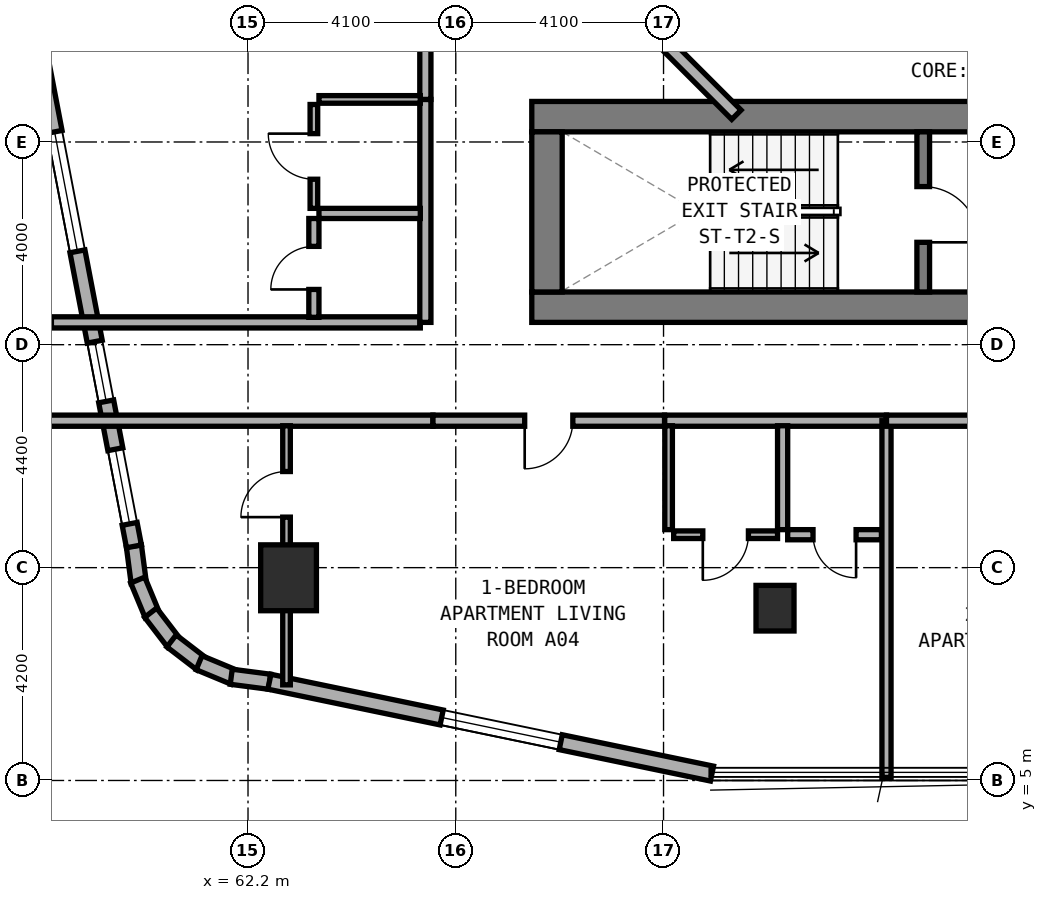
"""IFC4 building model, lengths in metres.
Left out: names, types, materials, properties, quantities, classifications, styles, units other than length and angle.
Written with IfcOpenShell. Run it as: python <this file> out.ifc"""

import sys

from ifc_helpers import new_model, si_unit, direction, frame, frame_2d, origin, origin_2d, place, context, subcontext, project, spatial, rectangle, extrude, element, fill, save


model = new_model("IFC4")
c1 = context("Model", 3, precision=1e-05, world=origin(), true_north=direction((0.0, 1.0)))
c2 = subcontext(c1, "Body", "Model", "MODEL_VIEW")
j1 = project(units=[si_unit("LENGTHUNIT", "METRE"), si_unit("PLANEANGLEUNIT", "RADIAN")], contexts=[c1])
p1 = place(None, origin())
s1 = spatial("IfcSite", under=j1, at=p1, CompositionType="ELEMENT")
p2 = place(p1, origin())
s2 = spatial("IfcBuilding", under=s1, at=p2, CompositionType="ELEMENT")
p3 = place(p2, frame((0.0, 0.0, 31.0)))
s3 = spatial("IfcBuildingStorey", under=s2, at=p3, CompositionType="ELEMENT", Elevation=31.0)
p4 = place(p3, frame((67.8, 14.34, 0.0), z_axis=(0.0, 0.0, 1.0), x_axis=(1.0, 0.0, 0.0)))
e1 = element("IfcWall", 1, at=p4, inside=s3, PredefinedType="SHEAR", context=c2, shape_type="SweptSolid", body=[
    extrude(rectangle(XDim=18.6, YDim=0.6, at=frame_2d((9.3, 0.0))), origin(), (0.0, 0.0, 1.0), 3.5),
])
p5 = place(p4, frame((9.35, 0.0, 0.0)))
e2 = element("IfcOpeningElement", 2, at=p5, cuts=e1, PredefinedType="OPENING", context=c2, shape_type="SweptSolid", body=[
    extrude(rectangle(XDim=1.2, YDim=2.15, at=frame_2d((0.6, 1.075))), frame((0.0, 0.31, 0.0), z_axis=(0.0, -1.0, 0.0), x_axis=(1.0, 0.0, 0.0)), (0.0, 0.0, 1.0), 0.62),
])
p6 = place(p4, frame((16.95, 0.0, 0.0)))
e3 = element("IfcOpeningElement", 3, at=p6, cuts=e1, PredefinedType="OPENING", context=c2, shape_type="SweptSolid", body=[
    extrude(rectangle(XDim=0.85, YDim=2.1, at=frame_2d((0.425, 1.05))), frame((0.0, 0.31, 0.0), z_axis=(0.0, -1.0, 0.0), x_axis=(1.0, 0.0, 0.0)), (0.0, 0.0, 1.0), 0.62),
])
p7 = place(p4, frame((12.55, 0.0, 0.0)))
e4 = element("IfcOpeningElement", 4, at=p7, cuts=e1, PredefinedType="OPENING", context=c2, shape_type="SweptSolid", body=[
    extrude(rectangle(XDim=1.1, YDim=2.15, at=frame_2d((0.55, 1.075))), frame((0.0, 0.31, 0.0), z_axis=(0.0, -1.0, 0.0), x_axis=(1.0, 0.0, 0.0)), (0.0, 0.0, 1.0), 0.62),
])
p8 = place(p4, frame((14.15, 0.0, 0.0)))
e5 = element("IfcOpeningElement", 5, at=p8, cuts=e1, PredefinedType="OPENING", context=c2, shape_type="SweptSolid", body=[
    extrude(rectangle(XDim=1.1, YDim=2.15, at=frame_2d((0.55, 1.075))), frame((0.0, 0.31, 0.0), z_axis=(0.0, -1.0, 0.0), x_axis=(1.0, 0.0, 0.0)), (0.0, 0.0, 1.0), 0.62),
])
p9 = place(p3, frame((67.8, 18.1, 0.0), z_axis=(0.0, 0.0, 1.0), x_axis=(1.0, 0.0, 0.0)))
e6 = element("IfcWall", 6, at=p9, inside=s3, PredefinedType="SHEAR", context=c2, shape_type="SweptSolid", body=[
    extrude(rectangle(XDim=18.6, YDim=0.6, at=frame_2d((9.3, 0.0))), origin(), (0.0, 0.0, 1.0), 3.5),
])
p10 = place(p3, frame((68.1, 14.64, 0.0), z_axis=(0.0, 0.0, 1.0), x_axis=(0.0, 1.0, 0.0)))
e7 = element("IfcWall", 7, at=p10, inside=s3, PredefinedType="SHEAR", context=c2, shape_type="SweptSolid", body=[
    extrude(rectangle(XDim=3.16, YDim=0.6, at=frame_2d((1.58, 0.0))), origin(), (0.0, 0.0, 1.0), 3.5),
])
p11 = place(p3, frame((75.525, 14.64, 0.0), z_axis=(0.0, 0.0, 1.0), x_axis=(0.0, 1.0, 0.0)))
e8 = element("IfcWall", 8, at=p11, inside=s3, PredefinedType="STANDARD", context=c2, shape_type="SweptSolid", body=[
    extrude(rectangle(XDim=3.16, YDim=0.25, at=frame_2d((1.58, 0.0))), origin(), (0.0, 0.0, 1.0), 3.25),
])
p12 = place(p11, frame((0.98, 0.0, 0.0)))
e9 = element("IfcOpeningElement", 9, at=p12, cuts=e8, PredefinedType="OPENING", context=c2, shape_type="SweptSolid", body=[
    extrude(rectangle(XDim=1.1, YDim=2.15, at=frame_2d((0.55, 1.075))), frame((0.0, 0.135, 0.0), z_axis=(0.0, -1.0, 0.0), x_axis=(1.0, 0.0, 0.0)), (0.0, 0.0, 1.0), 0.27),
])
p13 = place(p3, frame((72.6, 8.4, 0.0), z_axis=(0.0, 0.0, 1.0), x_axis=(1.0, 0.0, 0.0)))
e10 = element("IfcColumn", 10, at=p13, inside=s3, PredefinedType="COLUMN", context=c2, shape_type="SweptSolid", body=[
    extrude(rectangle(XDim=0.75, YDim=0.9, at=origin_2d()), origin(), (0.0, 0.0, 1.0), 3.5),
])
p14 = place(p3, frame((63.0, 9.0, 0.0), z_axis=(0.0, 0.0, 1.0), x_axis=(1.0, 0.0, 0.0)))
e11 = element("IfcColumn", 11, at=p14, inside=s3, PredefinedType="COLUMN", context=c2, shape_type="SweptSolid", body=[
    extrude(rectangle(XDim=1.1, YDim=1.3, at=origin_2d()), origin(), (0.0, 0.0, 1.0), 3.5),
])
p15 = place(p3, frame((59.948, 9.627, 0.0), z_axis=(0.0, 0.0, 1.0), x_axis=(0.130255288807, -0.991480488834, 0.0)))
e12 = element("IfcWall", 12, at=p15, inside=s3, PredefinedType="STANDARD", context=c2, shape_type="SweptSolid", body=[
    extrude(rectangle(XDim=0.729, YDim=0.3, at=frame_2d((0.365, 0.0))), origin(), (0.0, 0.0, 1.0), 3.25),
])
for number, where, z_axis, x_axis in (
    (13, (60.024, 8.955, 0.0), (0.0, 0.0, 1.0), (0.384, -0.924, 0.0)),
    (14, (60.279, 8.311, 0.0), (0.0, 0.0, 1.0), (0.608, -0.794, 0.0)),
    (15, (60.691, 7.754, 0.0), (0.0, 0.0, 1.0), (0.794, -0.608, 0.0)),
    (16, (61.234, 7.324, 0.0), (0.0, 0.0, 1.0), (0.924, -0.383, 0.0)),
):
    element("IfcWall", number, at=place(p3, frame(where, z_axis=z_axis, x_axis=x_axis)), inside=s3, PredefinedType="STANDARD", context=c2, shape_type="SweptSolid", body=[
        extrude(rectangle(XDim=0.746, YDim=0.3, at=frame_2d((0.373, 0.0))), origin(), (0.0, 0.0, 1.0), 3.25),
    ])
p16 = place(p3, frame((61.869, 7.047, 0.0), z_axis=(0.0, 0.0, 1.0), x_axis=(0.991559404866, -0.129653178221, 0.0)))
e17 = element("IfcWall", 17, at=p16, inside=s3, PredefinedType="STANDARD", context=c2, shape_type="SweptSolid", body=[
    extrude(rectangle(XDim=0.764, YDim=0.3, at=frame_2d((0.382, 0.0))), origin(), (0.0, 0.0, 1.0), 3.25),
])
p17 = place(p3, frame((62.622, 6.949, 0.0), z_axis=(0.0, 0.0, 1.0), x_axis=(0.979127260729, -0.203248142175, 0.0)))
e18 = element("IfcWall", 18, at=p17, inside=s3, PredefinedType="STANDARD", context=c2, shape_type="SweptSolid", body=[
    extrude(rectangle(XDim=8.92, YDim=0.3, at=frame_2d((4.46, 0.0))), origin(), (0.0, 0.0, 1.0), 3.25),
])
p18 = place(p17, frame((3.472, 0.0, 0.8)))
e19 = element("IfcOpeningElement", 19, at=p18, cuts=e18, PredefinedType="OPENING", context=c2, shape_type="SweptSolid", body=[
    extrude(rectangle(XDim=2.4, YDim=1.6, at=frame_2d((1.2, 0.8))), frame((0.0, 0.16, 0.0), z_axis=(0.0, -1.0, 0.0), x_axis=(1.0, 0.0, 0.0)), (0.0, 0.0, 1.0), 0.32),
])
p19 = place(p3, frame((58.137, 19.082, 0.0), z_axis=(0.0, 0.0, 1.0), x_axis=(0.188087874316, -0.982152203854, 0.0)))
e20 = element("IfcWall", 20, at=p19, inside=s3, PredefinedType="STANDARD", context=c2, shape_type="SweptSolid", body=[
    extrude(rectangle(XDim=9.634, YDim=0.3, at=frame_2d((4.817, 0.0))), origin(), (0.0, 0.0, 1.0), 3.25),
])
p20 = place(p19, frame((1.306, 0.0, 0.8)))
e21 = element("IfcOpeningElement", 21, at=p20, cuts=e20, PredefinedType="OPENING", context=c2, shape_type="SweptSolid", body=[
    extrude(rectangle(XDim=2.4, YDim=1.6, at=frame_2d((1.2, 0.8))), frame((0.0, 0.16, 0.0), z_axis=(0.0, -1.0, 0.0), x_axis=(1.0, 0.0, 0.0)), (0.0, 0.0, 1.0), 0.32),
])
p21 = place(p19, frame((5.521, 0.0, 0.85)))
e22 = element("IfcOpeningElement", 22, at=p21, cuts=e20, PredefinedType="OPENING", context=c2, shape_type="SweptSolid", body=[
    extrude(rectangle(XDim=1.2, YDim=1.5, at=frame_2d((0.6, 0.75))), frame((0.0, 0.16, 0.0), z_axis=(0.0, -1.0, 0.0), x_axis=(1.0, 0.0, 0.0)), (0.0, 0.0, 1.0), 0.32),
])
p22 = place(p19, frame((7.682, 0.0, 0.85)))
e23 = element("IfcOpeningElement", 23, at=p22, cuts=e20, PredefinedType="OPENING", context=c2, shape_type="SweptSolid", body=[
    extrude(rectangle(XDim=1.5, YDim=1.5, at=frame_2d((0.75, 0.75))), frame((0.0, 0.16, 0.0), z_axis=(0.0, -1.0, 0.0), x_axis=(1.0, 0.0, 0.0)), (0.0, 0.0, 1.0), 0.32),
])
p23 = place(p3, frame((70.204, 19.772, 0.0), z_axis=(0.0, 0.0, 1.0), x_axis=(0.707053950914, -0.707159607512, 0.0)))
e24 = element("IfcWall", 24, at=p23, inside=s3, PredefinedType="STANDARD", context=c2, shape_type="SweptSolid", body=[
    extrude(rectangle(XDim=2.311, YDim=0.26, at=frame_2d((1.155, 0.0))), origin(), (0.0, 0.0, 1.0), 3.25),
])
p24 = place(p3, frame((58.16, 12.1, 0.0), z_axis=(0.0, 0.0, 1.0), x_axis=(1.0, 0.0, 0.0)))
e25 = element("IfcWall", 25, at=p24, inside=s3, PredefinedType="SOLIDWALL", context=c2, shape_type="SweptSolid", body=[
    extrude(rectangle(XDim=7.69, YDim=0.22, at=frame_2d((3.845, 0.0))), origin(), (0.0, 0.0, 1.0), 2.865),
])
p25 = place(p3, frame((70.42, 12.1, 0.0), z_axis=(0.0, 0.0, 1.0), x_axis=(1.0, 0.0, 0.0)))
e26 = element("IfcWall", 26, at=p25, inside=s3, PredefinedType="SOLIDWALL", context=c2, shape_type="SweptSolid", body=[
    extrude(rectangle(XDim=4.38, YDim=0.22, at=frame_2d((2.19, 0.0))), origin(), (0.0, 0.0, 1.0), 2.725),
])
p26 = place(p3, frame((65.85, 12.1, 0.0), z_axis=(0.0, 0.0, 1.0), x_axis=(1.0, 0.0, 0.0)))
e27 = element("IfcWall", 27, at=p26, inside=s3, PredefinedType="SOLIDWALL", context=c2, shape_type="SweptSolid", body=[
    extrude(rectangle(XDim=4.57, YDim=0.22, at=frame_2d((2.285, 0.0))), origin(), (0.0, 0.0, 1.0), 3.22),
])
p27 = place(p26, frame((1.81, 0.0, 0.0)))
e28 = element("IfcOpeningElement", 28, at=p27, cuts=e27, PredefinedType="OPENING", context=c2, shape_type="SweptSolid", body=[
    extrude(rectangle(XDim=0.95, YDim=2.1, at=frame_2d((0.475, 1.05))), frame((0.0, 0.12, 0.0), z_axis=(0.0, -1.0, 0.0), x_axis=(1.0, 0.0, 0.0)), (0.0, 0.0, 1.0), 0.24),
])
p28 = place(p3, frame((62.96, 6.887, 0.0), z_axis=(0.0, 0.0, 1.0), x_axis=(0.0, 1.0, 0.0)))
e29 = element("IfcWall", 29, at=p28, inside=s3, PredefinedType="PARTITIONING", context=c2, shape_type="SweptSolid", body=[
    extrude(rectangle(XDim=5.113, YDim=0.15, at=frame_2d((2.557, 0.0))), origin(), (0.0, 0.0, 1.0), 2.865),
])
p29 = place(p28, frame((3.31, 0.0, 0.0)))
e30 = element("IfcOpeningElement", 30, at=p29, cuts=e29, PredefinedType="OPENING", context=c2, shape_type="SweptSolid", body=[
    extrude(rectangle(XDim=0.9, YDim=2.1, at=frame_2d((0.45, 1.05))), frame((0.0, 0.085, 0.0), z_axis=(0.0, -1.0, 0.0), x_axis=(1.0, 0.0, 0.0)), (0.0, 0.0, 1.0), 0.17),
])
p30 = place(p3, frame((72.75, 9.95, 0.0), z_axis=(0.0, 0.0, 1.0), x_axis=(0.0, 1.0, 0.0)))
e31 = element("IfcWall", 31, at=p30, inside=s3, PredefinedType="PLUMBINGWALL", context=c2, shape_type="SweptSolid", body=[
    extrude(rectangle(XDim=2.05, YDim=0.2, at=frame_2d((1.025, 0.0))), origin(), (0.0, 0.0, 1.0), 2.725),
])
p31 = place(p3, frame((70.5, 9.95, 0.0), z_axis=(0.0, 0.0, 1.0), x_axis=(0.0, 1.0, 0.0)))
e32 = element("IfcWall", 32, at=p31, inside=s3, PredefinedType="PARTITIONING", context=c2, shape_type="SweptSolid", body=[
    extrude(rectangle(XDim=2.05, YDim=0.15, at=frame_2d((1.025, 0.0))), origin(), (0.0, 0.0, 1.0), 3.22),
])
p32 = place(p3, frame((72.85, 9.85, 0.0), z_axis=(0.0, 0.0, 1.0), x_axis=(1.0, 0.0, 0.0)))
e33 = element("IfcWall", 33, at=p32, inside=s3, PredefinedType="PLUMBINGWALL", context=c2, shape_type="SweptSolid", body=[
    extrude(rectangle(XDim=1.85, YDim=0.2, at=frame_2d((0.925, 0.0))), origin(), (0.0, 0.0, 1.0), 3.22),
])
p33 = place(p32, frame((0.5, 0.0, 0.0)))
e34 = element("IfcOpeningElement", 34, at=p33, cuts=e33, PredefinedType="OPENING", context=c2, shape_type="SweptSolid", body=[
    extrude(rectangle(XDim=0.85, YDim=2.1, at=frame_2d((0.425, 1.05))), frame((0.0, 0.11, 0.0), z_axis=(0.0, -1.0, 0.0), x_axis=(1.0, 0.0, 0.0)), (0.0, 0.0, 1.0), 0.22),
])
p34 = place(p3, frame((70.6, 9.85, 0.0), z_axis=(0.0, 0.0, 1.0), x_axis=(1.0, 0.0, 0.0)))
e35 = element("IfcWall", 35, at=p34, inside=s3, PredefinedType="PARTITIONING", context=c2, shape_type="SweptSolid", body=[
    extrude(rectangle(XDim=2.05, YDim=0.15, at=frame_2d((1.025, 0.0))), origin(), (0.0, 0.0, 1.0), 2.725),
])
p35 = place(p34, frame((0.575, 0.0, 0.0)))
e36 = element("IfcOpeningElement", 36, at=p35, cuts=e35, PredefinedType="OPENING", context=c2, shape_type="SweptSolid", body=[
    extrude(rectangle(XDim=0.9, YDim=2.1, at=frame_2d((0.45, 1.05))), frame((0.0, 0.085, 0.0), z_axis=(0.0, -1.0, 0.0), x_axis=(1.0, 0.0, 0.0)), (0.0, 0.0, 1.0), 0.17),
])
p36 = place(p3, frame((74.8, 5.06, 0.0), z_axis=(0.0, 0.0, 1.0), x_axis=(0.0, 1.0, 0.0)))
e37 = element("IfcWall", 37, at=p36, inside=s3, PredefinedType="SOLIDWALL", context=c2, shape_type="SweptSolid", body=[
    extrude(rectangle(XDim=7.04, YDim=0.18, at=frame_2d((3.52, 0.0))), origin(), (0.0, 0.0, 1.0), 2.825),
])
p37 = place(p3, frame((74.8, 12.1, 0.0), z_axis=(0.0, 0.0, 1.0), x_axis=(1.0, 0.0, 0.0)))
e38 = element("IfcWall", 38, at=p37, inside=s3, PredefinedType="SOLIDWALL", context=c2, shape_type="SweptSolid", body=[
    extrude(rectangle(XDim=5.83, YDim=0.22, at=frame_2d((2.915, 0.0))), origin(), (0.0, 0.0, 1.0), 3.22),
])
p38 = place(p3, frame((58.32, 14.04, 0.0), z_axis=(0.0, 0.0, 1.0), x_axis=(1.0, 0.0, 0.0)))
e39 = element("IfcWall", 39, at=p38, inside=s3, PredefinedType="SOLIDWALL", context=c2, shape_type="SweptSolid", body=[
    extrude(rectangle(XDim=7.28, YDim=0.22, at=frame_2d((3.64, 0.0))), origin(), (0.0, 0.0, 1.0), 2.865),
])
p39 = place(p3, frame((65.7, 14.04, 0.0), z_axis=(0.0, 0.0, 1.0), x_axis=(0.0, 1.0, 0.0)))
e40 = element("IfcWall", 40, at=p39, inside=s3, PredefinedType="SOLIDWALL", context=c2, shape_type="SweptSolid", body=[
    extrude(rectangle(XDim=4.4, YDim=0.22, at=frame_2d((2.2, 0.0))), origin(), (0.0, 0.0, 1.0), 3.22),
])
p40 = place(p3, frame((65.7, 18.44, 0.0), z_axis=(0.0, 0.0, 1.0), x_axis=(0.0, 1.0, 0.0)))
e41 = element("IfcWall", 41, at=p40, inside=s3, PredefinedType="SOLIDWALL", context=c2, shape_type="SweptSolid", body=[
    extrude(rectangle(XDim=9.56, YDim=0.22, at=frame_2d((4.78, 0.0))), origin(), (0.0, 0.0, 1.0), 2.725),
])
p41 = place(p40, frame((2.405, 0.0, 0.0)))
e42 = element("IfcOpeningElement", 42, at=p41, cuts=e41, PredefinedType="OPENING", context=c2, shape_type="SweptSolid", body=[
    extrude(rectangle(XDim=0.95, YDim=2.1, at=frame_2d((0.475, 1.05))), frame((0.0, 0.12, 0.0), z_axis=(0.0, -1.0, 0.0), x_axis=(1.0, 0.0, 0.0)), (0.0, 0.0, 1.0), 0.24),
])
p42 = place(p3, frame((63.6, 16.19, 0.0), z_axis=(0.0, 0.0, 1.0), x_axis=(1.0, 0.0, 0.0)))
e43 = element("IfcWall", 43, at=p42, inside=s3, PredefinedType="PLUMBINGWALL", context=c2, shape_type="SweptSolid", body=[
    extrude(rectangle(XDim=2.0, YDim=0.2, at=frame_2d((1.0, 0.0))), origin(), (0.0, 0.0, 1.0), 3.22),
])
p43 = place(p3, frame((63.6, 18.44, 0.0), z_axis=(0.0, 0.0, 1.0), x_axis=(1.0, 0.0, 0.0)))
e44 = element("IfcWall", 44, at=p43, inside=s3, PredefinedType="PARTITIONING", context=c2, shape_type="SweptSolid", body=[
    extrude(rectangle(XDim=2.0, YDim=0.15, at=frame_2d((1.0, 0.0))), origin(), (0.0, 0.0, 1.0), 3.22),
])
p44 = place(p3, frame((63.5, 14.14, 0.0), z_axis=(0.0, 0.0, 1.0), x_axis=(0.0, 1.0, 0.0)))
e45 = element("IfcWall", 45, at=p44, inside=s3, PredefinedType="PLUMBINGWALL", context=c2, shape_type="SweptSolid", body=[
    extrude(rectangle(XDim=1.95, YDim=0.2, at=frame_2d((0.975, 0.0))), origin(), (0.0, 0.0, 1.0), 3.22),
])
p45 = place(p44, frame((0.55, 0.0, 0.0)))
e46 = element("IfcOpeningElement", 46, at=p45, cuts=e45, PredefinedType="OPENING", context=c2, shape_type="SweptSolid", body=[
    extrude(rectangle(XDim=0.85, YDim=2.1, at=frame_2d((0.425, 1.05))), frame((0.0, 0.11, 0.0), z_axis=(0.0, -1.0, 0.0), x_axis=(1.0, 0.0, 0.0)), (0.0, 0.0, 1.0), 0.22),
])
p46 = place(p3, frame((63.5, 16.29, 0.0), z_axis=(0.0, 0.0, 1.0), x_axis=(0.0, 1.0, 0.0)))
e47 = element("IfcWall", 47, at=p46, inside=s3, PredefinedType="PARTITIONING", context=c2, shape_type="SweptSolid", body=[
    extrude(rectangle(XDim=2.05, YDim=0.15, at=frame_2d((1.025, 0.0))), origin(), (0.0, 0.0, 1.0), 3.22),
])
p47 = place(p46, frame((0.575, 0.0, 0.0)))
e48 = element("IfcOpeningElement", 48, at=p47, cuts=e47, PredefinedType="OPENING", context=c2, shape_type="SweptSolid", body=[
    extrude(rectangle(XDim=0.9, YDim=2.1, at=frame_2d((0.45, 1.05))), frame((0.0, 0.085, 0.0), z_axis=(0.0, -1.0, 0.0), x_axis=(1.0, 0.0, 0.0)), (0.0, 0.0, 1.0), 0.17),
])
p48 = place(p18, origin())
e49 = element("IfcWindow", 49, at=p48, inside=s3, PartitioningType="SINGLE_PANEL", PredefinedType="WINDOW", context=c2, shape_type="SweptSolid", body=[
    extrude(rectangle(XDim=2.4, YDim=1.6, at=frame_2d((1.2, 0.8))), frame((0.0, 0.03, 0.0), z_axis=(0.0, -1.0, 0.0), x_axis=(1.0, 0.0, 0.0)), (0.0, 0.0, 1.0), 0.06),
])
fill(e19, e49)
p49 = place(p20, origin())
e50 = element("IfcWindow", 50, at=p49, inside=s3, PartitioningType="SINGLE_PANEL", PredefinedType="WINDOW", context=c2, shape_type="SweptSolid", body=[
    extrude(rectangle(XDim=2.4, YDim=1.6, at=frame_2d((1.2, 0.8))), frame((0.0, 0.03, 0.0), z_axis=(0.0, -1.0, 0.0), x_axis=(1.0, 0.0, 0.0)), (0.0, 0.0, 1.0), 0.06),
])
fill(e21, e50)
p50 = place(p21, origin())
e51 = element("IfcWindow", 51, at=p50, inside=s3, PartitioningType="SINGLE_PANEL", PredefinedType="WINDOW", context=c2, shape_type="SweptSolid", body=[
    extrude(rectangle(XDim=1.2, YDim=1.5, at=frame_2d((0.6, 0.75))), frame((0.0, 0.03, 0.0), z_axis=(0.0, -1.0, 0.0), x_axis=(1.0, 0.0, 0.0)), (0.0, 0.0, 1.0), 0.06),
])
fill(e22, e51)
p51 = place(p22, origin())
e52 = element("IfcWindow", 52, at=p51, inside=s3, PartitioningType="SINGLE_PANEL", PredefinedType="WINDOW", context=c2, shape_type="SweptSolid", body=[
    extrude(rectangle(XDim=1.5, YDim=1.5, at=frame_2d((0.75, 0.75))), frame((0.0, 0.03, 0.0), z_axis=(0.0, -1.0, 0.0), x_axis=(1.0, 0.0, 0.0)), (0.0, 0.0, 1.0), 0.06),
])
fill(e23, e52)
p52 = place(p12, frame((1.1, 0.0, 0.0), z_axis=(0.0, 0.0, 1.0), x_axis=(-1.0, 0.0, 0.0)))
e53 = element("IfcDoor", 53, at=p52, inside=s3, OperationType="SINGLE_SWING_RIGHT", PredefinedType="DOOR", context=c2, shape_type="SweptSolid", body=[
    extrude(rectangle(XDim=1.1, YDim=2.15, at=frame_2d((0.55, 1.075))), frame((0.0, 0.025, 0.0), z_axis=(0.0, -1.0, 0.0), x_axis=(1.0, 0.0, 0.0)), (0.0, 0.0, 1.0), 0.05),
])
fill(e9, e53)
p53 = place(p27, frame((0.95, 0.0, 0.0), z_axis=(0.0, 0.0, 1.0), x_axis=(-1.0, 0.0, 0.0)))
e54 = element("IfcDoor", 54, at=p53, inside=s3, OperationType="SINGLE_SWING_RIGHT", PredefinedType="DOOR", context=c2, shape_type="SweptSolid", body=[
    extrude(rectangle(XDim=0.95, YDim=2.1, at=frame_2d((0.475, 1.05))), frame((0.0, 0.025, 0.0), z_axis=(0.0, -1.0, 0.0), x_axis=(1.0, 0.0, 0.0)), (0.0, 0.0, 1.0), 0.05),
])
fill(e28, e54)
p54 = place(p29, origin())
e55 = element("IfcDoor", 55, at=p54, inside=s3, OperationType="SINGLE_SWING_LEFT", PredefinedType="DOOR", context=c2, shape_type="SweptSolid", body=[
    extrude(rectangle(XDim=0.9, YDim=2.1, at=frame_2d((0.45, 1.05))), frame((0.0, 0.025, 0.0), z_axis=(0.0, -1.0, 0.0), x_axis=(1.0, 0.0, 0.0)), (0.0, 0.0, 1.0), 0.05),
])
fill(e30, e55)
p55 = place(p33, frame((0.85, 0.0, 0.0), z_axis=(0.0, 0.0, 1.0), x_axis=(-1.0, 0.0, 0.0)))
e56 = element("IfcDoor", 56, at=p55, inside=s3, OperationType="SINGLE_SWING_LEFT", PredefinedType="DOOR", context=c2, shape_type="SweptSolid", body=[
    extrude(rectangle(XDim=0.85, YDim=2.1, at=frame_2d((0.425, 1.05))), frame((0.0, 0.025, 0.0), z_axis=(0.0, -1.0, 0.0), x_axis=(1.0, 0.0, 0.0)), (0.0, 0.0, 1.0), 0.05),
])
fill(e34, e56)
p56 = place(p35, frame((0.9, 0.0, 0.0), z_axis=(0.0, 0.0, 1.0), x_axis=(-1.0, 0.0, 0.0)))
e57 = element("IfcDoor", 57, at=p56, inside=s3, OperationType="SINGLE_SWING_RIGHT", PredefinedType="DOOR", context=c2, shape_type="SweptSolid", body=[
    extrude(rectangle(XDim=0.9, YDim=2.1, at=frame_2d((0.45, 1.05))), frame((0.0, 0.025, 0.0), z_axis=(0.0, -1.0, 0.0), x_axis=(1.0, 0.0, 0.0)), (0.0, 0.0, 1.0), 0.05),
])
fill(e36, e57)
p57 = place(p45, origin())
e58 = element("IfcDoor", 58, at=p57, inside=s3, OperationType="SINGLE_SWING_LEFT", PredefinedType="DOOR", context=c2, shape_type="SweptSolid", body=[
    extrude(rectangle(XDim=0.85, YDim=2.1, at=frame_2d((0.425, 1.05))), frame((0.0, 0.025, 0.0), z_axis=(0.0, -1.0, 0.0), x_axis=(1.0, 0.0, 0.0)), (0.0, 0.0, 1.0), 0.05),
])
fill(e46, e58)
p58 = place(p47, origin())
e59 = element("IfcDoor", 59, at=p58, inside=s3, OperationType="SINGLE_SWING_RIGHT", PredefinedType="DOOR", context=c2, shape_type="SweptSolid", body=[
    extrude(rectangle(XDim=0.9, YDim=2.1, at=frame_2d((0.45, 1.05))), frame((0.0, 0.025, 0.0), z_axis=(0.0, -1.0, 0.0), x_axis=(1.0, 0.0, 0.0)), (0.0, 0.0, 1.0), 0.05),
])
fill(e48, e59)
save(model, sys.argv[1])
